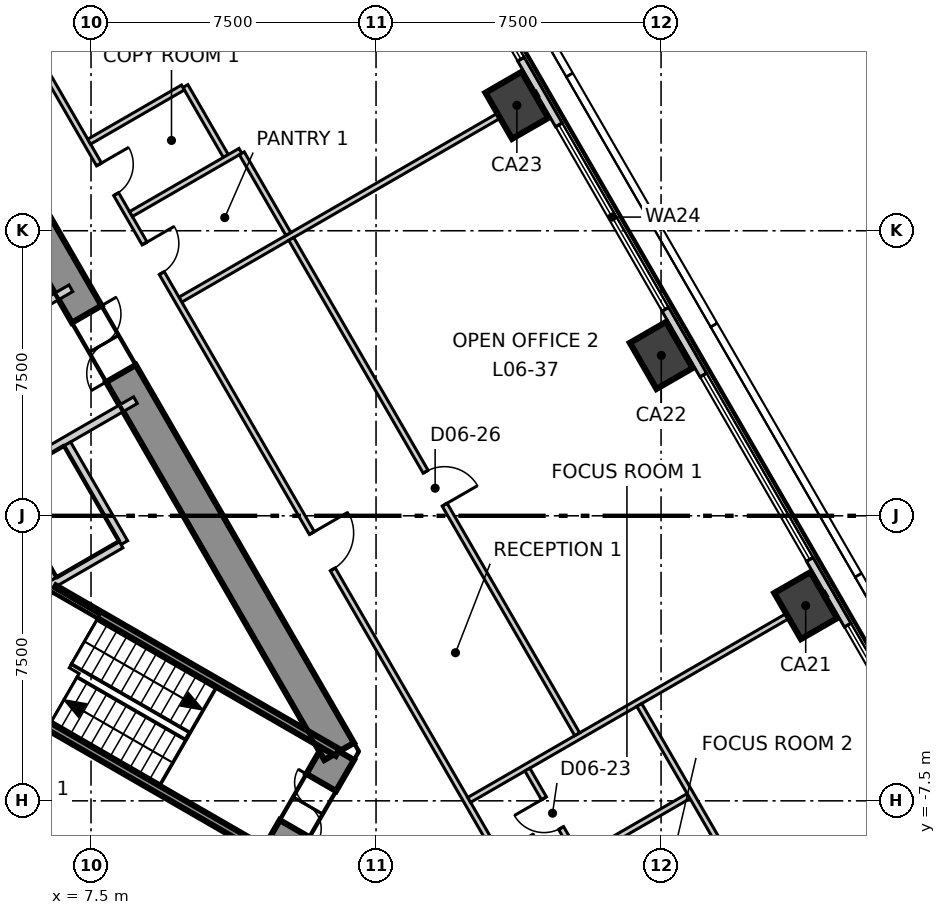
"""IFC4 building model, lengths in metres.
Left out: names, types, materials, properties, quantities, classifications, styles, units other than length and angle.
Written with IfcOpenShell. Run it as: python <this file> out.ifc"""

import sys

from ifc_helpers import new_model, si_unit, direction, frame, frame_2d, origin, origin_2d, place, context, subcontext, project, spatial, polyline, rectangle, outline, extrude, element, fill, save


model = new_model("IFC4")
c1 = context("Model", 3, precision=1e-05, world=origin(), true_north=direction((0.0, 1.0)))
c2 = subcontext(c1, "Body", "Model", "MODEL_VIEW")
j1 = project(units=[si_unit("LENGTHUNIT", "METRE"), si_unit("PLANEANGLEUNIT", "RADIAN")], contexts=[c1])
p1 = place(None, origin())
s1 = spatial("IfcSite", under=j1, at=p1, CompositionType="ELEMENT")
p2 = place(p1, origin())
s2 = spatial("IfcBuilding", under=s1, at=p2, CompositionType="ELEMENT")
p3 = place(p2, frame((0.0, 0.0, 35.3)))
s3 = spatial("IfcBuildingStorey", under=s2, at=p3, CompositionType="ELEMENT", Elevation=35.3)
p4 = place(p3, frame((12.384, -9.05, -0.3), z_axis=(0.0, 0.0, 1.0), x_axis=(0.500111984565, 0.865960739811, 0.0)))
e1 = element("IfcWall", 1, at=p4, inside=s3, PredefinedType="SHEAR", context=c2, shape_type="SweptSolid", body=[
    extrude(outline(polyline([(-0.26, -0.45), (1.646, -0.449), (3.551, -0.449), (3.031, 0.45), (1.646, 0.45), (0.26, 0.45), (-0.26, -0.45)])), origin(), (0.0, 0.0, 1.0), 4.0),
])
p5 = place(p4, frame((0.946, 0.0, 0.3)))
e2 = element("IfcOpeningElement", 2, at=p5, cuts=e1, PredefinedType="OPENING", context=c2, shape_type="SweptSolid", body=[
    extrude(rectangle(XDim=1.4, YDim=2.1, at=frame_2d((0.7, 1.05))), frame((0.0, 0.46, 0.0), z_axis=(0.0, -1.0, 0.0), x_axis=(1.0, 0.0, 0.0)), (0.0, 0.0, 1.0), 0.92),
])
p6 = place(p3, frame((14.03, -6.2, -0.3), z_axis=(0.0, 0.0, 1.0), x_axis=(-0.500026485275, 0.866010111964, 0.0)))
e3 = element("IfcWall", 3, at=p6, inside=s3, PredefinedType="SHEAR", context=c2, shape_type="SweptSolid", body=[
    extrude(outline(polyline([(-0.26, -0.449), (1.685, -0.449), (3.63, -0.449), (5.576, -0.449), (7.521, -0.449), (9.466, -0.449), (11.411, -0.449), (13.357, -0.449), (15.302, -0.449), (17.247, -0.45), (19.192, -0.45), (21.138, -0.45), (23.083, -0.45), (25.028, -0.45), (24.509, 0.449), (22.644, 0.449), (20.778, 0.449), (18.913, 0.449), (17.048, 0.449), (15.182, 0.449), (13.317, 0.449), (11.452, 0.449), (9.587, 0.449), (7.721, 0.45), (5.856, 0.45), (3.991, 0.45), (2.125, 0.45), (0.26, 0.45), (-0.26, -0.449)])), origin(), (0.0, 0.0, 1.0), 4.0),
])
p7 = place(p6, frame((11.484, 0.0, 0.3)))
e4 = element("IfcOpeningElement", 4, at=p7, cuts=e3, PredefinedType="OPENING", context=c2, shape_type="SweptSolid", body=[
    extrude(rectangle(XDim=1.8, YDim=2.1, at=frame_2d((0.9, 1.05))), frame((0.0, 0.46, 0.0), z_axis=(0.0, -1.0, 0.0), x_axis=(1.0, 0.0, 0.0)), (0.0, 0.0, 1.0), 0.92),
])
p8 = place(p6, frame((18.976, 0.0, 0.3)))
e5 = element("IfcOpeningElement", 5, at=p8, cuts=e3, PredefinedType="OPENING", context=c2, shape_type="SweptSolid", body=[
    extrude(rectangle(XDim=0.9, YDim=2.1, at=frame_2d((0.45, 1.05))), frame((0.0, 0.46, 0.0), z_axis=(0.0, -1.0, 0.0), x_axis=(1.0, 0.0, 0.0)), (0.0, 0.0, 1.0), 0.92),
])
for number, where, z_axis, x_axis in (
    (6, (26.306, -2.363, -0.3), (0.0, 0.0, 1.0), (-0.5, 0.866, 0.0)),
    (7, (22.506, 4.219, -0.3), (0.0, 0.0, 1.0), (-0.5, 0.866, 0.0)),
    (8, (18.706, 10.8, -0.3), (0.0, 0.0, 1.0), (-0.5, 0.866, 0.0)),
):
    element("IfcColumn", number, at=place(p3, frame(where, z_axis=z_axis, x_axis=x_axis)), inside=s3, PredefinedType="COLUMN", context=c2, shape_type="SweptSolid", body=[
        extrude(rectangle(XDim=1.4, YDim=1.1, at=origin_2d()), origin(), (0.0, 0.0, 1.0), 4.0),
    ])
p9 = place(p3, frame((35.163, -16.303, 0.0), z_axis=(0.0, 0.0, 1.0), x_axis=(-0.500012207976, 0.866018355391, 0.0)))
e9 = element("IfcWall", 9, at=p9, inside=s3, PredefinedType="ELEMENTEDWALL", context=c2, shape_type="SweptSolid", body=[
    extrude(rectangle(XDim=63.381, YDim=0.2, at=frame_2d((31.69, 0.0))), origin(), (0.0, 0.0, 1.0), 3.7),
])
p10 = place(p9, frame((2.302, 0.0, 0.9)))
e10 = element("IfcOpeningElement", 10, at=p10, cuts=e9, PredefinedType="OPENING", context=c2, shape_type="SweptSolid", body=[
    extrude(rectangle(XDim=5.6, YDim=2.5, at=frame_2d((2.8, 1.25))), frame((0.0, 0.11, 0.0), z_axis=(0.0, -1.0, 0.0), x_axis=(1.0, 0.0, 0.0)), (0.0, 0.0, 1.0), 0.22),
])
p11 = place(p9, frame((9.902, 0.0, 0.9)))
e11 = element("IfcOpeningElement", 11, at=p11, cuts=e9, PredefinedType="OPENING", context=c2, shape_type="SweptSolid", body=[
    extrude(rectangle(XDim=5.6, YDim=2.5, at=frame_2d((2.8, 1.25))), frame((0.0, 0.11, 0.0), z_axis=(0.0, -1.0, 0.0), x_axis=(1.0, 0.0, 0.0)), (0.0, 0.0, 1.0), 0.22),
])
p12 = place(p9, frame((17.501, 0.0, 0.9)))
e12 = element("IfcOpeningElement", 12, at=p12, cuts=e9, PredefinedType="OPENING", context=c2, shape_type="SweptSolid", body=[
    extrude(rectangle(XDim=5.6, YDim=2.5, at=frame_2d((2.8, 1.25))), frame((0.0, 0.11, 0.0), z_axis=(0.0, -1.0, 0.0), x_axis=(1.0, 0.0, 0.0)), (0.0, 0.0, 1.0), 0.22),
])
p13 = place(p9, frame((25.101, 0.0, 0.9)))
e13 = element("IfcOpeningElement", 13, at=p13, cuts=e9, PredefinedType="OPENING", context=c2, shape_type="SweptSolid", body=[
    extrude(rectangle(XDim=5.6, YDim=2.5, at=frame_2d((2.8, 1.25))), frame((0.0, 0.11, 0.0), z_axis=(0.0, -1.0, 0.0), x_axis=(1.0, 0.0, 0.0)), (0.0, 0.0, 1.0), 0.22),
])
p14 = place(p9, frame((32.7, 0.0, 0.9)))
e14 = element("IfcOpeningElement", 14, at=p14, cuts=e9, PredefinedType="OPENING", context=c2, shape_type="SweptSolid", body=[
    extrude(rectangle(XDim=5.6, YDim=2.5, at=frame_2d((2.8, 1.25))), frame((0.0, 0.11, 0.0), z_axis=(0.0, -1.0, 0.0), x_axis=(1.0, 0.0, 0.0)), (0.0, 0.0, 1.0), 0.22),
])
p15 = place(p9, frame((40.299, 0.0, 0.9)))
e15 = element("IfcOpeningElement", 15, at=p15, cuts=e9, PredefinedType="OPENING", context=c2, shape_type="SweptSolid", body=[
    extrude(rectangle(XDim=5.6, YDim=2.5, at=frame_2d((2.8, 1.25))), frame((0.0, 0.11, 0.0), z_axis=(0.0, -1.0, 0.0), x_axis=(1.0, 0.0, 0.0)), (0.0, 0.0, 1.0), 0.22),
])
p16 = place(p9, frame((47.899, 0.0, 0.9)))
e16 = element("IfcOpeningElement", 16, at=p16, cuts=e9, PredefinedType="OPENING", context=c2, shape_type="SweptSolid", body=[
    extrude(rectangle(XDim=5.6, YDim=2.5, at=frame_2d((2.8, 1.25))), frame((0.0, 0.11, 0.0), z_axis=(0.0, -1.0, 0.0), x_axis=(1.0, 0.0, 0.0)), (0.0, 0.0, 1.0), 0.22),
])
p17 = place(p9, frame((55.498, 0.0, 0.9)))
e17 = element("IfcOpeningElement", 17, at=p17, cuts=e9, PredefinedType="OPENING", context=c2, shape_type="SweptSolid", body=[
    extrude(rectangle(XDim=5.6, YDim=2.5, at=frame_2d((2.8, 1.25))), frame((0.0, 0.11, 0.0), z_axis=(0.0, -1.0, 0.0), x_axis=(1.0, 0.0, 0.0)), (0.0, 0.0, 1.0), 0.22),
])
p18 = place(p3, frame((9.851, 5.687, 0.0), z_axis=(0.0, 0.0, 1.0), x_axis=(0.865997012005, 0.50004917278, 0.0)))
e18 = element("IfcWall", 18, at=p18, inside=s3, PredefinedType="PARTITIONING", context=c2, shape_type="SweptSolid", body=[
    extrude(rectangle(XDim=10.845, YDim=0.15, at=frame_2d((5.423, 0.0))), origin(), (0.0, 0.0, 1.0), 3.2),
])
p19 = place(p3, frame((0.075, 22.47, 0.0), z_axis=(0.0, 0.0, 1.0), x_axis=(0.500002280369, -0.866024087209, 0.0)))
e19 = element("IfcWall", 19, at=p19, inside=s3, PredefinedType="PARTITIONING", context=c2, shape_type="SweptSolid", body=[
    extrude(rectangle(XDim=38.844, YDim=0.15, at=frame_2d((19.422, 0.0))), origin(), (0.0, 0.0, 1.0), 3.7),
])
p20 = place(p19, frame((36.244, 0.0, 0.0)))
e20 = element("IfcOpeningElement", 20, at=p20, cuts=e19, PredefinedType="OPENING", context=c2, shape_type="SweptSolid", body=[
    extrude(rectangle(XDim=1.1, YDim=2.1, at=frame_2d((0.55, 1.05))), frame((0.0, 0.085, 0.0), z_axis=(0.0, -1.0, 0.0), x_axis=(1.0, 0.0, 0.0)), (0.0, 0.0, 1.0), 0.17),
])
p21 = place(p19, frame((26.472, 0.0, 0.0)))
e21 = element("IfcOpeningElement", 21, at=p21, cuts=e19, PredefinedType="OPENING", context=c2, shape_type="SweptSolid", body=[
    extrude(rectangle(XDim=1.1, YDim=2.1, at=frame_2d((0.55, 1.05))), frame((0.0, 0.085, 0.0), z_axis=(0.0, -1.0, 0.0), x_axis=(1.0, 0.0, 0.0)), (0.0, 0.0, 1.0), 0.17),
])
p22 = place(p19, frame((8.872, 0.0, 0.0)))
e22 = element("IfcOpeningElement", 22, at=p22, cuts=e19, PredefinedType="OPENING", context=c2, shape_type="SweptSolid", body=[
    extrude(rectangle(XDim=1.1, YDim=2.1, at=frame_2d((0.55, 1.05))), frame((0.0, 0.085, 0.0), z_axis=(0.0, -1.0, 0.0), x_axis=(1.0, 0.0, 0.0)), (0.0, 0.0, 1.0), 0.17),
])
p23 = place(p19, frame((17.672, 0.0, 0.0)))
e23 = element("IfcOpeningElement", 23, at=p23, cuts=e19, PredefinedType="OPENING", context=c2, shape_type="SweptSolid", body=[
    extrude(rectangle(XDim=0.9, YDim=2.1, at=frame_2d((0.45, 1.05))), frame((0.0, 0.085, 0.0), z_axis=(0.0, -1.0, 0.0), x_axis=(1.0, 0.0, 0.0)), (0.0, 0.0, 1.0), 0.17),
])
p24 = place(p19, frame((15.272, 0.0, 0.0)))
e24 = element("IfcOpeningElement", 24, at=p24, cuts=e19, PredefinedType="OPENING", context=c2, shape_type="SweptSolid", body=[
    extrude(rectangle(XDim=0.9, YDim=2.1, at=frame_2d((0.45, 1.05))), frame((0.0, 0.085, 0.0), z_axis=(0.0, -1.0, 0.0), x_axis=(1.0, 0.0, 0.0)), (0.0, 0.0, 1.0), 0.17),
])
p25 = place(p19, frame((1.473, 0.0, 0.0)))
e25 = element("IfcOpeningElement", 25, at=p25, cuts=e19, PredefinedType="OPENING", context=c2, shape_type="SweptSolid", body=[
    extrude(rectangle(XDim=1.1, YDim=2.1, at=frame_2d((0.55, 1.05))), frame((0.0, 0.085, 0.0), z_axis=(0.0, -1.0, 0.0), x_axis=(1.0, 0.0, 0.0)), (0.0, 0.0, 1.0), 0.17),
])
p26 = place(p3, frame((9.984, 11.307, 0.0), z_axis=(0.0, 0.0, 1.0), x_axis=(0.500352247806, -0.86582193788, 0.0)))
e26 = element("IfcWall", 26, at=p26, inside=s3, PredefinedType="PARTITIONING", context=c2, shape_type="SweptSolid", body=[
    extrude(rectangle(XDim=2.125, YDim=0.15, at=frame_2d((1.062, 0.0))), origin(), (0.0, 0.0, 1.0), 3.7),
])
p27 = place(p3, frame((7.451, 9.844, 0.0), z_axis=(0.0, 0.0, 1.0), x_axis=(0.866004402611, 0.500036373335, 0.0)))
e27 = element("IfcWall", 27, at=p27, inside=s3, PredefinedType="PARTITIONING", context=c2, shape_type="SweptSolid", body=[
    extrude(rectangle(XDim=2.85, YDim=0.15, at=frame_2d((1.425, 0.0))), origin(), (0.0, 0.0, 1.0), 3.7),
])
p28 = place(p3, frame((8.551, 7.939, 0.0), z_axis=(0.0, 0.0, 1.0), x_axis=(0.865975293465, 0.500086783578, 0.0)))
e28 = element("IfcWall", 28, at=p28, inside=s3, PredefinedType="PARTITIONING", context=c2, shape_type="SweptSolid", body=[
    extrude(rectangle(XDim=3.326, YDim=0.15, at=frame_2d((1.663, 0.0))), origin(), (0.0, 0.0, 1.0), 3.7),
])
p29 = place(p3, frame((11.468, 9.537, 0.0), z_axis=(0.0, 0.0, 1.0), x_axis=(0.499975448907, -0.8660395779, 0.0)))
e29 = element("IfcWall", 29, at=p29, inside=s3, PredefinedType="PARTITIONING", context=c2, shape_type="SweptSolid", body=[
    extrude(rectangle(XDim=2.45, YDim=0.15, at=frame_2d((1.225, 0.0))), origin(), (0.0, 0.0, 1.0), 3.7),
])
p30 = place(p3, frame((17.451, -7.476, 0.0), z_axis=(0.0, 0.0, 1.0), x_axis=(0.866002640836, 0.50003942451, 0.0)))
e30 = element("IfcWall", 30, at=p30, inside=s3, PredefinedType="PARTITIONING", context=c2, shape_type="SweptSolid", body=[
    extrude(rectangle(XDim=10.845, YDim=0.15, at=frame_2d((5.423, 0.0))), origin(), (0.0, 0.0, 1.0), 3.7),
])
p31 = place(p3, frame((12.768, 7.285, 0.0), z_axis=(0.0, 0.0, 1.0), x_axis=(0.500015945769, -0.866016197294, 0.0)))
e31 = element("IfcWall", 31, at=p31, inside=s3, PredefinedType="PARTITIONING", context=c2, shape_type="SweptSolid", body=[
    extrude(rectangle(XDim=15.049, YDim=0.15, at=frame_2d((7.525, 0.0))), origin(), (0.0, 0.0, 1.0), 3.7),
])
p32 = place(p31, frame((7.074, 0.0, 0.0)))
e32 = element("IfcOpeningElement", 32, at=p32, cuts=e31, PredefinedType="OPENING", context=c2, shape_type="SweptSolid", body=[
    extrude(rectangle(XDim=1.0, YDim=2.1, at=frame_2d((0.5, 1.05))), frame((0.0, 0.085, 0.0), z_axis=(0.0, -1.0, 0.0), x_axis=(1.0, 0.0, 0.0)), (0.0, 0.0, 1.0), 0.17),
])
p33 = place(p3, frame((20.41, -9.0, 0.0), z_axis=(0.0, 0.0, 1.0), x_axis=(0.86599666273, 0.500049777664, 0.0)))
e33 = element("IfcWall", 33, at=p33, inside=s3, PredefinedType="PARTITIONING", context=c2, shape_type="SweptSolid", body=[
    extrude(rectangle(XDim=3.25, YDim=0.15, at=frame_2d((1.625, 0.0))), origin(), (0.0, 0.0, 1.0), 3.7),
])
p34 = place(p3, frame((21.927, -4.978, 0.0), z_axis=(0.0, 0.0, 1.0), x_axis=(0.499917542299, -0.866073005526, 0.0)))
e34 = element("IfcWall", 34, at=p34, inside=s3, PredefinedType="PARTITIONING", context=c2, shape_type="SweptSolid", body=[
    extrude(rectangle(XDim=5.525, YDim=0.15, at=frame_2d((2.762, 0.0))), origin(), (0.0, 0.0, 1.0), 3.7),
])
p35 = place(p3, frame((18.982, -6.678, 0.0), z_axis=(0.0, 0.0, 1.0), x_axis=(0.500083244257, -0.865977337356, 0.0)))
e35 = element("IfcWall", 35, at=p35, inside=s3, PredefinedType="PARTITIONING", context=c2, shape_type="SweptSolid", body=[
    extrude(rectangle(XDim=5.525, YDim=0.15, at=frame_2d((2.763, 0.0))), origin(), (0.0, 0.0, 1.0), 3.7),
])
p36 = place(p35, frame((0.875, 0.0, 0.0)))
e36 = element("IfcOpeningElement", 36, at=p36, cuts=e35, PredefinedType="OPENING", context=c2, shape_type="SweptSolid", body=[
    extrude(rectangle(XDim=0.9, YDim=2.1, at=frame_2d((0.45, 1.05))), frame((0.0, 0.085, 0.0), z_axis=(0.0, -1.0, 0.0), x_axis=(1.0, 0.0, 0.0)), (0.0, 0.0, 1.0), 0.17),
])
p37 = place(p3, frame((1.578, 2.874, 0.0), z_axis=(0.0, 0.0, 1.0), x_axis=(0.866031483044, 0.499989470266, 0.0)))
e37 = element("IfcWall", 37, at=p37, inside=s3, PredefinedType="SOLIDWALL", context=c2, shape_type="SweptSolid", body=[
    extrude(rectangle(XDim=6.226, YDim=0.2, at=frame_2d((3.113, 0.0))), origin(), (0.0, 0.0, 1.0), 3.7),
])
p38 = place(p37, frame((2.496, 0.0, 0.0)))
e38 = element("IfcOpeningElement", 38, at=p38, cuts=e37, PredefinedType="OPENING", context=c2, shape_type="SweptSolid", body=[
    extrude(rectangle(XDim=1.1, YDim=2.1, at=frame_2d((0.55, 1.05))), frame((0.0, 0.11, 0.0), z_axis=(0.0, -1.0, 0.0), x_axis=(1.0, 0.0, 0.0)), (0.0, 0.0, 1.0), 0.22),
])
p39 = place(p3, frame((3.278, -0.071, 0.0), z_axis=(0.0, 0.0, 1.0), x_axis=(0.865953757655, 0.500124074208, 0.0)))
e39 = element("IfcWall", 39, at=p39, inside=s3, PredefinedType="SOLIDWALL", context=c2, shape_type="SweptSolid", body=[
    extrude(rectangle(XDim=6.227, YDim=0.2, at=frame_2d((3.113, 0.0))), origin(), (0.0, 0.0, 1.0), 3.7),
])
p40 = place(p3, frame((6.876, 1.891, 0.0), z_axis=(0.0, 0.0, 1.0), x_axis=(0.499990139034, -0.866031096941, 0.0)))
e40 = element("IfcWall", 40, at=p40, inside=s3, PredefinedType="SOLIDWALL", context=c2, shape_type="SweptSolid", body=[
    extrude(rectangle(XDim=3.0, YDim=0.2, at=frame_2d((1.5, 0.0))), origin(), (0.0, 0.0, 1.0), 3.7),
])
p41 = place(p3, frame((5.057, 0.841, 0.0), z_axis=(0.0, 0.0, 1.0), x_axis=(0.50012328804, -0.865954211699, 0.0)))
e41 = element("IfcWall", 41, at=p41, inside=s3, PredefinedType="SOLIDWALL", context=c2, shape_type="SweptSolid", body=[
    extrude(rectangle(XDim=2.9, YDim=0.2, at=frame_2d((1.45, 0.0))), origin(), (0.0, 0.0, 1.0), 3.7),
])
p42 = place(p3, frame((4.9, -2.714, 0.0), z_axis=(0.0, 0.0, 1.0), x_axis=(0.865992350556, 0.500057245502, 0.0)))
e42 = element("IfcWall", 42, at=p42, inside=s3, PredefinedType="SOLIDWALL", context=c2, shape_type="SweptSolid", body=[
    extrude(rectangle(XDim=3.914, YDim=0.2, at=frame_2d((1.957, 0.0))), origin(), (0.0, 0.0, 1.0), 3.7),
])
p43 = place(p3, frame((4.929, -4.693, 0.0), z_axis=(0.0, 0.0, 1.0), x_axis=(0.866010975815, -0.500024989144, 0.0)))
e43 = element("IfcWall", 43, at=p43, inside=s3, PredefinedType="SOLIDWALL", context=c2, shape_type="SweptSolid", body=[
    extrude(rectangle(XDim=8.615, YDim=0.2, at=frame_2d((4.308, 0.0))), origin(), (0.0, 0.0, 1.0), 3.7),
])
p44 = place(p3, frame((6.529, -1.922, 0.0), z_axis=(0.0, 0.0, 1.0), x_axis=(0.866060059011, -0.499939970583, 0.0)))
e44 = element("IfcWall", 44, at=p44, inside=s3, PredefinedType="SOLIDWALL", context=c2, shape_type="SweptSolid", body=[
    extrude(rectangle(XDim=8.615, YDim=0.2, at=frame_2d((4.307, 0.0))), origin(), (0.0, 0.0, 1.0), 3.7),
])
p45 = place(p11, origin())
e45 = element("IfcWindow", 45, at=p45, inside=s3, PartitioningType="SINGLE_PANEL", PredefinedType="WINDOW", context=c2, shape_type="SweptSolid", body=[
    extrude(rectangle(XDim=5.6, YDim=2.5, at=frame_2d((2.8, 1.25))), frame((0.0, 0.03, 0.0), z_axis=(0.0, -1.0, 0.0), x_axis=(1.0, 0.0, 0.0)), (0.0, 0.0, 1.0), 0.06),
])
fill(e11, e45)
p46 = place(p12, origin())
e46 = element("IfcWindow", 46, at=p46, inside=s3, PartitioningType="SINGLE_PANEL", PredefinedType="WINDOW", context=c2, shape_type="SweptSolid", body=[
    extrude(rectangle(XDim=5.6, YDim=2.5, at=frame_2d((2.8, 1.25))), frame((0.0, 0.03, 0.0), z_axis=(0.0, -1.0, 0.0), x_axis=(1.0, 0.0, 0.0)), (0.0, 0.0, 1.0), 0.06),
])
fill(e12, e46)
p47 = place(p13, origin())
e47 = element("IfcWindow", 47, at=p47, inside=s3, PartitioningType="SINGLE_PANEL", PredefinedType="WINDOW", context=c2, shape_type="SweptSolid", body=[
    extrude(rectangle(XDim=5.6, YDim=2.5, at=frame_2d((2.8, 1.25))), frame((0.0, 0.03, 0.0), z_axis=(0.0, -1.0, 0.0), x_axis=(1.0, 0.0, 0.0)), (0.0, 0.0, 1.0), 0.06),
])
fill(e13, e47)
p48 = place(p14, origin())
e48 = element("IfcWindow", 48, at=p48, inside=s3, PartitioningType="SINGLE_PANEL", PredefinedType="WINDOW", context=c2, shape_type="SweptSolid", body=[
    extrude(rectangle(XDim=5.6, YDim=2.5, at=frame_2d((2.8, 1.25))), frame((0.0, 0.03, 0.0), z_axis=(0.0, -1.0, 0.0), x_axis=(1.0, 0.0, 0.0)), (0.0, 0.0, 1.0), 0.06),
])
fill(e14, e48)
p49 = place(p36, origin())
e49 = element("IfcDoor", 49, at=p49, inside=s3, OperationType="SINGLE_SWING_LEFT", PredefinedType="DOOR", context=c2, shape_type="SweptSolid", body=[
    extrude(rectangle(XDim=0.9, YDim=2.1, at=frame_2d((0.45, 1.05))), frame((0.0, 0.025, 0.0), z_axis=(0.0, -1.0, 0.0), x_axis=(1.0, 0.0, 0.0)), (0.0, 0.0, 1.0), 0.05),
])
fill(e36, e49)
p50 = place(p21, origin())
e50 = element("IfcDoor", 50, at=p50, inside=s3, OperationType="SINGLE_SWING_RIGHT", PredefinedType="DOOR", context=c2, shape_type="SweptSolid", body=[
    extrude(rectangle(XDim=1.1, YDim=2.1, at=frame_2d((0.55, 1.05))), frame((0.0, 0.025, 0.0), z_axis=(0.0, -1.0, 0.0), x_axis=(1.0, 0.0, 0.0)), (0.0, 0.0, 1.0), 0.05),
])
fill(e21, e50)
p51 = place(p32, origin())
e51 = element("IfcDoor", 51, at=p51, inside=s3, OperationType="SINGLE_SWING_LEFT", PredefinedType="DOOR", context=c2, shape_type="SweptSolid", body=[
    extrude(rectangle(XDim=1.0, YDim=2.1, at=frame_2d((0.5, 1.05))), frame((0.0, 0.025, 0.0), z_axis=(0.0, -1.0, 0.0), x_axis=(1.0, 0.0, 0.0)), (0.0, 0.0, 1.0), 0.05),
])
fill(e32, e51)
p52 = place(p23, origin())
e52 = element("IfcDoor", 52, at=p52, inside=s3, OperationType="SINGLE_SWING_RIGHT", PredefinedType="DOOR", context=c2, shape_type="SweptSolid", body=[
    extrude(rectangle(XDim=0.9, YDim=2.1, at=frame_2d((0.45, 1.05))), frame((0.0, 0.025, 0.0), z_axis=(0.0, -1.0, 0.0), x_axis=(1.0, 0.0, 0.0)), (0.0, 0.0, 1.0), 0.05),
])
fill(e23, e52)
p53 = place(p24, origin())
e53 = element("IfcDoor", 53, at=p53, inside=s3, OperationType="SINGLE_SWING_RIGHT", PredefinedType="DOOR", context=c2, shape_type="SweptSolid", body=[
    extrude(rectangle(XDim=0.9, YDim=2.1, at=frame_2d((0.45, 1.05))), frame((0.0, 0.025, 0.0), z_axis=(0.0, -1.0, 0.0), x_axis=(1.0, 0.0, 0.0)), (0.0, 0.0, 1.0), 0.05),
])
fill(e24, e53)
p54 = place(p7, origin())
e54 = element("IfcDoor", 54, at=p54, inside=s3, OperationType="DOUBLE_DOOR_SINGLE_SWING", PredefinedType="DOOR", context=c2, shape_type="SweptSolid", body=[
    extrude(rectangle(XDim=1.8, YDim=2.1, at=frame_2d((0.9, 1.05))), frame((0.0, 0.025, 0.0), z_axis=(0.0, -1.0, 0.0), x_axis=(1.0, 0.0, 0.0)), (0.0, 0.0, 1.0), 0.05),
])
fill(e4, e54)
p55 = place(p5, origin())
e55 = element("IfcDoor", 55, at=p55, inside=s3, OperationType="DOUBLE_DOOR_SINGLE_SWING", PredefinedType="DOOR", context=c2, shape_type="SweptSolid", body=[
    extrude(rectangle(XDim=1.4, YDim=2.1, at=frame_2d((0.7, 1.05))), frame((0.0, 0.025, 0.0), z_axis=(0.0, -1.0, 0.0), x_axis=(1.0, 0.0, 0.0)), (0.0, 0.0, 1.0), 0.05),
])
fill(e2, e55)
save(model, sys.argv[1])
